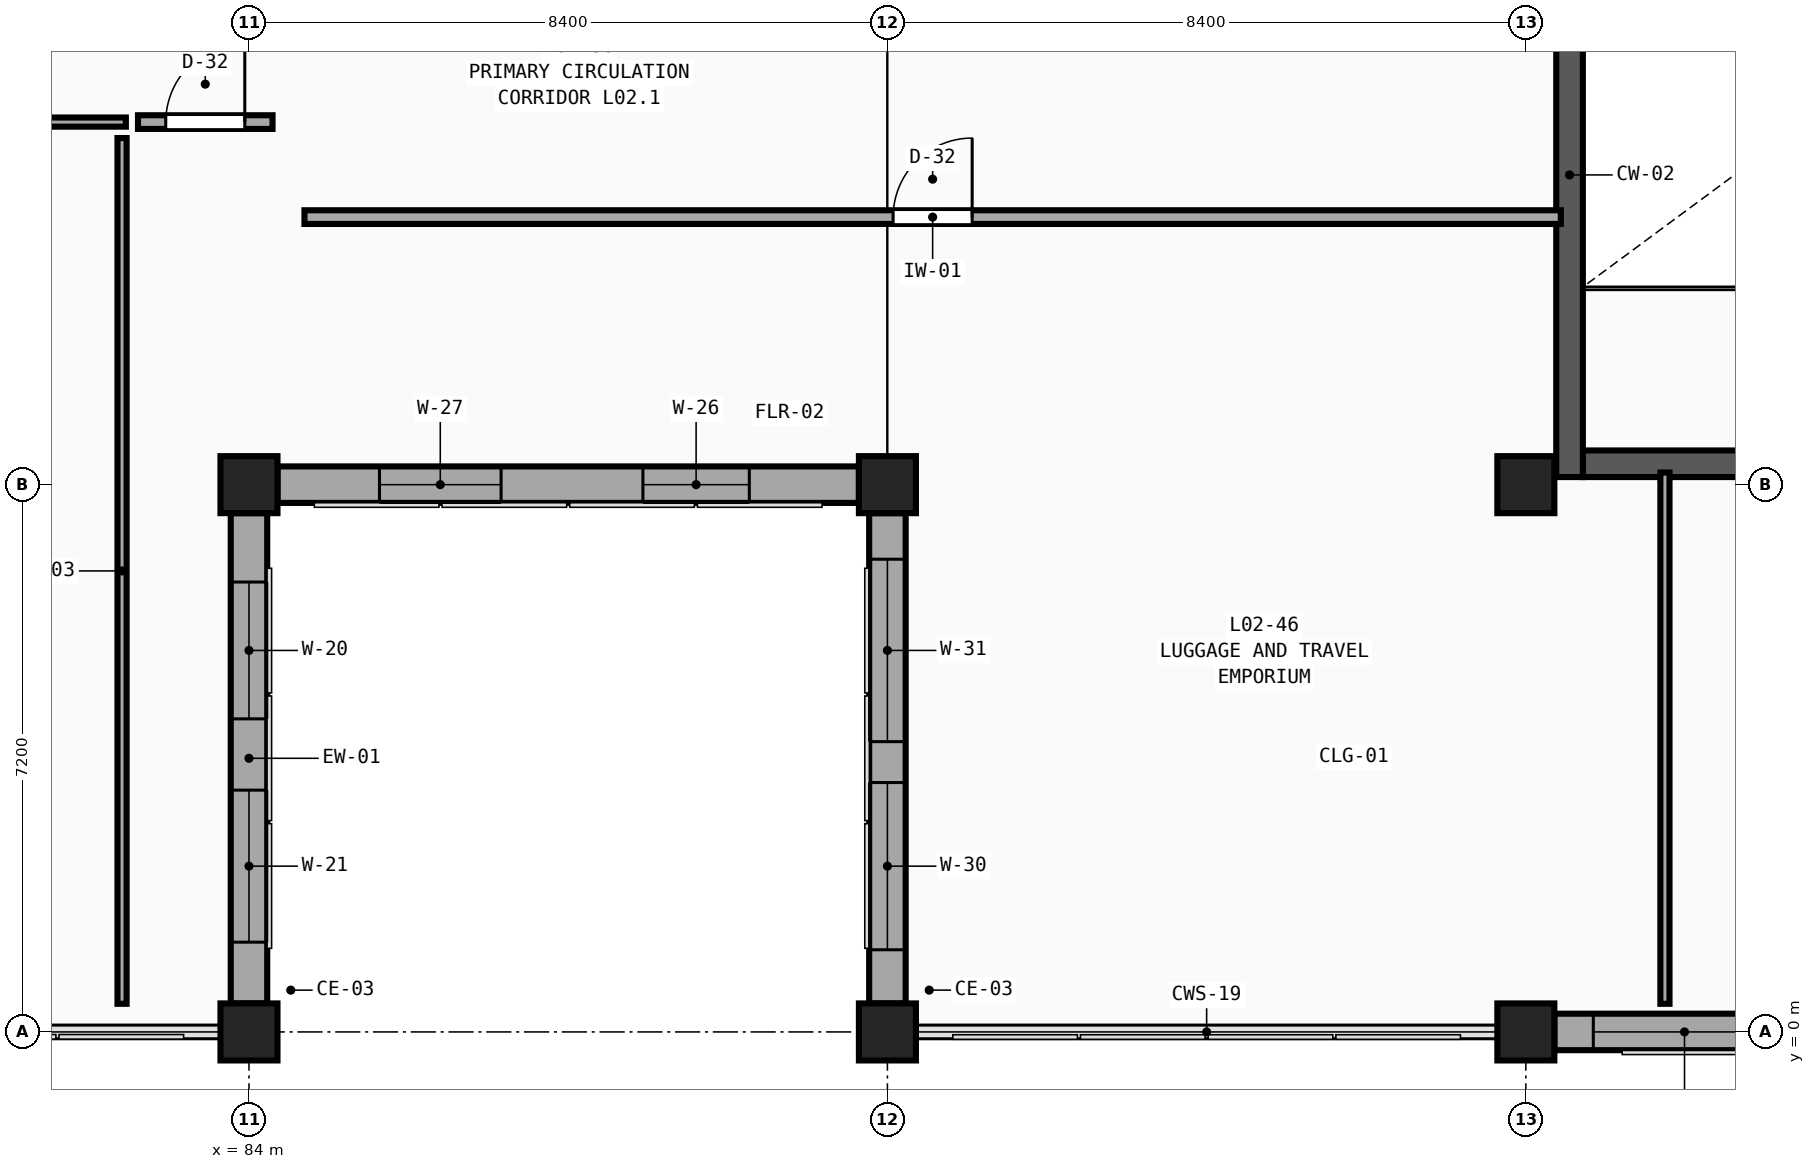
"""IFC4 building model, lengths in metres.
Left out: names, types, materials, properties, quantities, classifications, styles, units other than length and angle.
Written with IfcOpenShell. Run it as: python <this file> out.ifc"""

import sys

from ifc_helpers import new_model, si_unit, direction, frame, frame_2d, origin, origin_2d, place, context, subcontext, project, spatial, rectangle, extrude, element, fill, save


model = new_model("IFC4")
c1 = context("Model", 3, precision=1e-05, world=origin(), true_north=direction((0.0, 1.0)))
c2 = subcontext(c1, "Body", "Model", "MODEL_VIEW")
j1 = project(units=[si_unit("LENGTHUNIT", "METRE"), si_unit("PLANEANGLEUNIT", "RADIAN")], contexts=[c1])
p1 = place(None, origin())
s1 = spatial("IfcSite", under=j1, at=p1, CompositionType="ELEMENT")
p2 = place(p1, origin())
s2 = spatial("IfcBuilding", under=s1, at=p2, CompositionType="ELEMENT")
p3 = place(p2, frame((0.0, 0.0, 9.9)))
s3 = spatial("IfcBuildingStorey", under=s2, at=p3, CompositionType="ELEMENT", Elevation=9.9)
for number, where, z_axis, x_axis in (
    (1, (84.0, 0.0, 0.0), (0.0, 0.0, 1.0), (1.0, 0.0, 0.0)),
    (2, (84.0, 7.2, 0.0), (0.0, 0.0, 1.0), (1.0, 0.0, 0.0)),
    (3, (92.4, 0.0, 0.0), (0.0, 0.0, 1.0), (1.0, 0.0, 0.0)),
    (4, (92.4, 7.2, 0.0), (0.0, 0.0, 1.0), (1.0, 0.0, 0.0)),
    (5, (100.8, 0.0, 0.0), (0.0, 0.0, 1.0), (1.0, 0.0, 0.0)),
    (6, (100.8, 7.2, 0.0), (0.0, 0.0, 1.0), (1.0, 0.0, 0.0)),
):
    element("IfcColumn", number, at=place(p3, frame(where, z_axis=z_axis, x_axis=x_axis)), inside=s3, PredefinedType="COLUMN", context=c2, shape_type="SweptSolid", body=[
        extrude(rectangle(XDim=0.75, YDim=0.75, at=origin_2d()), origin(), (0.0, 0.0, 1.0), 4.5),
    ])
p4 = place(p3, frame((84.0, 6.825, 0.0), z_axis=(0.0, 0.0, 1.0), x_axis=(0.0, -1.0, 0.0)))
e7 = element("IfcWall", 7, at=p4, inside=s3, PredefinedType="SOLIDWALL", context=c2, shape_type="SweptSolid", body=[
    extrude(rectangle(XDim=6.45, YDim=0.48, at=frame_2d((3.225, 0.0))), origin(), (0.0, 0.0, 1.0), 3.63),
])
p5 = place(p4, frame((0.906, 0.0, 0.75)))
e8 = element("IfcOpeningElement", 8, at=p5, cuts=e7, PredefinedType="OPENING", context=c2, shape_type="SweptSolid", body=[
    extrude(rectangle(XDim=1.8, YDim=2.26, at=frame_2d((0.9, 1.13))), frame((0.0, 0.26, 0.0), z_axis=(0.0, -1.0, 0.0), x_axis=(1.0, 0.0, 0.0)), (0.0, 0.0, 1.0), 0.52),
])
p6 = place(p4, frame((3.644, 0.0, 0.75)))
e9 = element("IfcOpeningElement", 9, at=p6, cuts=e7, PredefinedType="OPENING", context=c2, shape_type="SweptSolid", body=[
    extrude(rectangle(XDim=2.0, YDim=2.26, at=frame_2d((1.0, 1.13))), frame((0.0, 0.26, 0.0), z_axis=(0.0, -1.0, 0.0), x_axis=(1.0, 0.0, 0.0)), (0.0, 0.0, 1.0), 0.52),
])
p7 = place(p3, frame((92.025, 7.2, 0.0), z_axis=(0.0, 0.0, 1.0), x_axis=(-1.0, 0.0, 0.0)))
e10 = element("IfcWall", 10, at=p7, inside=s3, PredefinedType="SOLIDWALL", context=c2, shape_type="SweptSolid", body=[
    extrude(rectangle(XDim=7.65, YDim=0.48, at=frame_2d((3.825, 0.0))), origin(), (0.0, 0.0, 1.0), 3.63),
])
p8 = place(p7, frame((1.442, 0.0, 0.75)))
e11 = element("IfcOpeningElement", 11, at=p8, cuts=e10, PredefinedType="OPENING", context=c2, shape_type="SweptSolid", body=[
    extrude(rectangle(XDim=1.4, YDim=2.44, at=frame_2d((0.7, 1.22))), frame((0.0, 0.26, 0.0), z_axis=(0.0, -1.0, 0.0), x_axis=(1.0, 0.0, 0.0)), (0.0, 0.0, 1.0), 0.52),
])
p9 = place(p7, frame((4.708, 0.0, 0.75)))
e12 = element("IfcOpeningElement", 12, at=p9, cuts=e10, PredefinedType="OPENING", context=c2, shape_type="SweptSolid", body=[
    extrude(rectangle(XDim=1.6, YDim=2.44, at=frame_2d((0.8, 1.22))), frame((0.0, 0.26, 0.0), z_axis=(0.0, -1.0, 0.0), x_axis=(1.0, 0.0, 0.0)), (0.0, 0.0, 1.0), 0.52),
])
p10 = place(p3, frame((92.4, 0.375, 0.0), z_axis=(0.0, 0.0, 1.0), x_axis=(0.0, 1.0, 0.0)))
e13 = element("IfcWall", 13, at=p10, inside=s3, PredefinedType="SOLIDWALL", context=c2, shape_type="SweptSolid", body=[
    extrude(rectangle(XDim=6.45, YDim=0.48, at=frame_2d((3.225, 0.0))), origin(), (0.0, 0.0, 1.0), 3.63),
])
p11 = place(p10, frame((0.706, 0.0, 0.75)))
e14 = element("IfcOpeningElement", 14, at=p11, cuts=e13, PredefinedType="OPENING", context=c2, shape_type="SweptSolid", body=[
    extrude(rectangle(XDim=2.2, YDim=2.44, at=frame_2d((1.1, 1.22))), frame((0.0, 0.26, 0.0), z_axis=(0.0, -1.0, 0.0), x_axis=(1.0, 0.0, 0.0)), (0.0, 0.0, 1.0), 0.52),
])
p12 = place(p10, frame((3.444, 0.0, 0.75)))
e15 = element("IfcOpeningElement", 15, at=p12, cuts=e13, PredefinedType="OPENING", context=c2, shape_type="SweptSolid", body=[
    extrude(rectangle(XDim=2.4, YDim=2.44, at=frame_2d((1.2, 1.22))), frame((0.0, 0.26, 0.0), z_axis=(0.0, -1.0, 0.0), x_axis=(1.0, 0.0, 0.0)), (0.0, 0.0, 1.0), 0.52),
])
p13 = place(p3, frame((104.6, 0.0, 0.0), z_axis=(0.0, 0.0, 1.0), x_axis=(-1.0, 0.0, 0.0)))
e16 = element("IfcWall", 16, at=p13, inside=s3, PredefinedType="SOLIDWALL", context=c2, shape_type="SweptSolid", body=[
    extrude(rectangle(XDim=3.425, YDim=0.48, at=frame_2d((1.712, 0.0))), origin(), (0.0, 0.0, 1.0), 3.63),
])
p14 = place(p13, frame((0.512, 0.0, 0.75)))
e17 = element("IfcOpeningElement", 17, at=p14, cuts=e16, PredefinedType="OPENING", context=c2, shape_type="SweptSolid", body=[
    extrude(rectangle(XDim=2.4, YDim=2.73, at=frame_2d((1.2, 1.365))), frame((0.0, 0.26, 0.0), z_axis=(0.0, -1.0, 0.0), x_axis=(1.0, 0.0, 0.0)), (0.0, 0.0, 1.0), 0.52),
])
p15 = place(p3, frame((108.45, 7.475, 0.0), z_axis=(0.0, 0.0, 1.0), x_axis=(-1.0, 0.0, 0.0)))
e18 = element("IfcWall", 18, at=p15, inside=s3, PredefinedType="SHEAR", context=c2, shape_type="SweptSolid", body=[
    extrude(rectangle(XDim=6.9, YDim=0.35, at=frame_2d((3.45, 0.0))), origin(), (0.0, 0.0, 1.0), 4.5),
])
p16 = place(p15, frame((2.9, 0.0, 0.0)))
e19 = element("IfcOpeningElement", 19, at=p16, cuts=e18, PredefinedType="OPENING", context=c2, shape_type="SweptSolid", body=[
    extrude(rectangle(XDim=1.1, YDim=2.2, at=frame_2d((0.55, 1.1))), frame((0.0, 0.195, 0.0), z_axis=(0.0, -1.0, 0.0), x_axis=(1.0, 0.0, 0.0)), (0.0, 0.0, 1.0), 0.39),
])
p17 = place(p3, frame((101.375, 15.25, 0.0), z_axis=(0.0, 0.0, 1.0), x_axis=(0.0, -1.0, 0.0)))
e20 = element("IfcWall", 20, at=p17, inside=s3, PredefinedType="SHEAR", context=c2, shape_type="SweptSolid", body=[
    extrude(rectangle(XDim=7.95, YDim=0.35, at=frame_2d((3.975, 0.0))), origin(), (0.0, 0.0, 1.0), 4.5),
])
p18 = place(p3, frame((84.73, 10.72, 0.0), z_axis=(0.0, 0.0, 1.0), x_axis=(1.0, 0.0, 0.0)))
e21 = element("IfcWall", 21, at=p18, inside=s3, PredefinedType="PARTITIONING", context=c2, shape_type="SweptSolid", body=[
    extrude(rectangle(XDim=16.53, YDim=0.18, at=frame_2d((8.265, 0.0))), origin(), (0.0, 0.0, 1.0), 4.18),
])
p19 = place(p18, frame((7.745, 0.0, 0.0)))
e22 = element("IfcOpeningElement", 22, at=p19, cuts=e21, PredefinedType="OPENING", context=c2, shape_type="SweptSolid", body=[
    extrude(rectangle(XDim=1.04, YDim=2.45, at=frame_2d((0.52, 1.225))), frame((0.0, 0.11, 0.0), z_axis=(0.0, -1.0, 0.0), x_axis=(1.0, 0.0, 0.0)), (0.0, 0.0, 1.0), 0.22),
])
p20 = place(p3, frame((72.48, 11.97, 0.0), z_axis=(0.0, 0.0, 1.0), x_axis=(1.0, 0.0, 0.0)))
e23 = element("IfcWall", 23, at=p20, inside=s3, PredefinedType="PARTITIONING", context=c2, shape_type="SweptSolid", body=[
    extrude(rectangle(XDim=9.9, YDim=0.12, at=frame_2d((4.95, 0.0))), origin(), (0.0, 0.0, 1.0), 4.18),
])
p21 = place(p20, frame((4.27, 0.0, 0.0)))
e24 = element("IfcOpeningElement", 24, at=p21, cuts=e23, PredefinedType="OPENING", context=c2, shape_type="SweptSolid", body=[
    extrude(rectangle(XDim=1.36, YDim=2.21, at=frame_2d((0.68, 1.105))), frame((0.0, 0.08, 0.0), z_axis=(0.0, -1.0, 0.0), x_axis=(1.0, 0.0, 0.0)), (0.0, 0.0, 1.0), 0.16),
])
p22 = place(p3, frame((82.54, 11.97, 0.0), z_axis=(0.0, 0.0, 1.0), x_axis=(1.0, 0.0, 0.0)))
e25 = element("IfcWall", 25, at=p22, inside=s3, PredefinedType="PARTITIONING", context=c2, shape_type="SweptSolid", body=[
    extrude(rectangle(XDim=1.77, YDim=0.18, at=frame_2d((0.885, 0.0))), origin(), (0.0, 0.0, 1.0), 4.18),
])
p23 = place(p22, frame((0.365, 0.0, 0.0)))
e26 = element("IfcOpeningElement", 26, at=p23, cuts=e25, PredefinedType="OPENING", context=c2, shape_type="SweptSolid", body=[
    extrude(rectangle(XDim=1.04, YDim=2.45, at=frame_2d((0.52, 1.225))), frame((0.0, 0.11, 0.0), z_axis=(0.0, -1.0, 0.0), x_axis=(1.0, 0.0, 0.0)), (0.0, 0.0, 1.0), 0.22),
])
p24 = place(p3, frame((82.33, 0.37, 0.0), z_axis=(0.0, 0.0, 1.0), x_axis=(0.0, 1.0, 0.0)))
e27 = element("IfcWall", 27, at=p24, inside=s3, PredefinedType="PARTITIONING", context=c2, shape_type="SweptSolid", body=[
    extrude(rectangle(XDim=11.39, YDim=0.12, at=frame_2d((5.695, 0.0))), origin(), (0.0, 0.0, 1.0), 4.18),
])
p25 = place(p3, frame((102.63, 0.37, 0.0), z_axis=(0.0, 0.0, 1.0), x_axis=(0.0, 1.0, 0.0)))
e28 = element("IfcWall", 28, at=p25, inside=s3, PredefinedType="PARTITIONING", context=c2, shape_type="SweptSolid", body=[
    extrude(rectangle(XDim=6.99, YDim=0.12, at=frame_2d((3.495, 0.0))), origin(), (0.0, 0.0, 1.0), 4.18),
])
p26 = place(p5, origin())
e29 = element("IfcWindow", 29, at=p26, inside=s3, PartitioningType="DOUBLE_PANEL_VERTICAL", PredefinedType="WINDOW", context=c2, shape_type="SweptSolid", body=[
    extrude(rectangle(XDim=1.8, YDim=2.26, at=frame_2d((0.9, 1.13))), frame((0.0, 0.03, 0.0), z_axis=(0.0, -1.0, 0.0), x_axis=(1.0, 0.0, 0.0)), (0.0, 0.0, 1.0), 0.06),
])
fill(e8, e29)
p27 = place(p6, origin())
e30 = element("IfcWindow", 30, at=p27, inside=s3, PartitioningType="TRIPLE_PANEL_VERTICAL", PredefinedType="WINDOW", context=c2, shape_type="SweptSolid", body=[
    extrude(rectangle(XDim=2.0, YDim=2.26, at=frame_2d((1.0, 1.13))), frame((0.0, 0.03, 0.0), z_axis=(0.0, -1.0, 0.0), x_axis=(1.0, 0.0, 0.0)), (0.0, 0.0, 1.0), 0.06),
])
fill(e9, e30)
p28 = place(p8, origin())
e31 = element("IfcWindow", 31, at=p28, inside=s3, PartitioningType="DOUBLE_PANEL_VERTICAL", PredefinedType="WINDOW", context=c2, shape_type="SweptSolid", body=[
    extrude(rectangle(XDim=1.4, YDim=2.44, at=frame_2d((0.7, 1.22))), frame((0.0, 0.03, 0.0), z_axis=(0.0, -1.0, 0.0), x_axis=(1.0, 0.0, 0.0)), (0.0, 0.0, 1.0), 0.06),
])
fill(e11, e31)
p29 = place(p9, origin())
e32 = element("IfcWindow", 32, at=p29, inside=s3, PartitioningType="DOUBLE_PANEL_VERTICAL", PredefinedType="WINDOW", context=c2, shape_type="SweptSolid", body=[
    extrude(rectangle(XDim=1.6, YDim=2.44, at=frame_2d((0.8, 1.22))), frame((0.0, 0.03, 0.0), z_axis=(0.0, -1.0, 0.0), x_axis=(1.0, 0.0, 0.0)), (0.0, 0.0, 1.0), 0.06),
])
fill(e12, e32)
p30 = place(p11, origin())
e33 = element("IfcWindow", 33, at=p30, inside=s3, PartitioningType="TRIPLE_PANEL_VERTICAL", PredefinedType="WINDOW", context=c2, shape_type="SweptSolid", body=[
    extrude(rectangle(XDim=2.2, YDim=2.44, at=frame_2d((1.1, 1.22))), frame((0.0, 0.03, 0.0), z_axis=(0.0, -1.0, 0.0), x_axis=(1.0, 0.0, 0.0)), (0.0, 0.0, 1.0), 0.06),
])
fill(e14, e33)
p31 = place(p12, origin())
e34 = element("IfcWindow", 34, at=p31, inside=s3, PartitioningType="TRIPLE_PANEL_VERTICAL", PredefinedType="WINDOW", context=c2, shape_type="SweptSolid", body=[
    extrude(rectangle(XDim=2.4, YDim=2.44, at=frame_2d((1.2, 1.22))), frame((0.0, 0.03, 0.0), z_axis=(0.0, -1.0, 0.0), x_axis=(1.0, 0.0, 0.0)), (0.0, 0.0, 1.0), 0.06),
])
fill(e15, e34)
p32 = place(p14, origin())
e35 = element("IfcWindow", 35, at=p32, inside=s3, PartitioningType="TRIPLE_PANEL_VERTICAL", PredefinedType="WINDOW", context=c2, shape_type="SweptSolid", body=[
    extrude(rectangle(XDim=2.4, YDim=2.73, at=frame_2d((1.2, 1.365))), frame((0.0, 0.03, 0.0), z_axis=(0.0, -1.0, 0.0), x_axis=(1.0, 0.0, 0.0)), (0.0, 0.0, 1.0), 0.06),
])
fill(e17, e35)
p33 = place(p19, origin())
e36 = element("IfcDoor", 36, at=p33, inside=s3, OperationType="SINGLE_SWING_RIGHT", PredefinedType="DOOR", context=c2, shape_type="SweptSolid", body=[
    extrude(rectangle(XDim=1.04, YDim=2.45, at=frame_2d((0.52, 1.225))), frame((0.0, 0.025, 0.0), z_axis=(0.0, -1.0, 0.0), x_axis=(1.0, 0.0, 0.0)), (0.0, 0.0, 1.0), 0.05),
])
fill(e22, e36)
p34 = place(p23, origin())
e37 = element("IfcDoor", 37, at=p34, inside=s3, OperationType="SINGLE_SWING_RIGHT", PredefinedType="DOOR", context=c2, shape_type="SweptSolid", body=[
    extrude(rectangle(XDim=1.04, YDim=2.45, at=frame_2d((0.52, 1.225))), frame((0.0, 0.025, 0.0), z_axis=(0.0, -1.0, 0.0), x_axis=(1.0, 0.0, 0.0)), (0.0, 0.0, 1.0), 0.05),
])
fill(e26, e37)
save(model, sys.argv[1])
